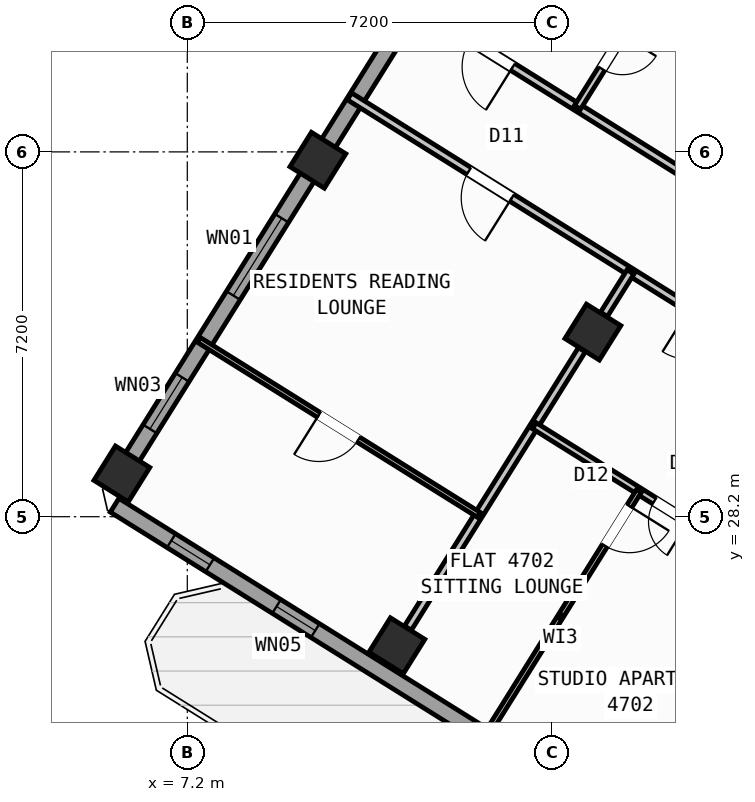
"""IFC4 building model, lengths in metres.
Left out: names, types, materials, properties, quantities, classifications, styles, units other than length and angle.
Written with IfcOpenShell. Run it as: python <this file> out.ifc"""

import sys

from ifc_helpers import new_model, si_unit, direction, frame, frame_2d, origin, origin_2d, place, context, subcontext, project, spatial, rectangle, hollow_rectangle, extrude, source, transform, mapped, element, fill, save


model = new_model("IFC4")
c1 = context("Model", 3, precision=1e-05, world=origin(), true_north=direction((0.0, 1.0)))
c2 = subcontext(c1, "Body", "Model", "MODEL_VIEW")
j1 = project(units=[si_unit("LENGTHUNIT", "METRE"), si_unit("PLANEANGLEUNIT", "RADIAN")], contexts=[c1])
p1 = place(None, origin())
s1 = spatial("IfcSite", under=j1, at=p1, CompositionType="ELEMENT")
p2 = place(p1, origin())
s2 = spatial("IfcBuilding", under=s1, at=p2, CompositionType="ELEMENT")
p3 = place(p2, frame((0.0, 0.0, 187.8)))
s3 = spatial("IfcBuildingStorey", under=s2, at=p3, CompositionType="ELEMENT", Elevation=187.8)
m1 = source(origin(), c2, "Body", "SweptSolid", [
    extrude(hollow_rectangle(XDim=0.8, YDim=0.8, WallThickness=0.032, at=origin_2d()), origin(), (0.0, 0.0, 1.0), 3.6),
])
for number, where, z_axis, x_axis in (
    (1, (15.205, 31.844, 0.0), (0.0, 0.0, 1.0), (-0.848, 0.53, 0.0)),
    (2, (11.336, 25.653, 0.0), (0.0, 0.0, 1.0), (-0.848, 0.53, 0.0)),
    (3, (9.777, 35.235, 0.0), (0.0, 0.0, 1.0), (-0.848, 0.53, 0.0)),
    (4, (5.909, 29.044, 0.0), (0.0, 0.0, 1.0), (-0.848, 0.53, 0.0)),
):
    element("IfcColumn", number, at=place(p3, frame(where, z_axis=z_axis, x_axis=x_axis)), inside=s3, PredefinedType="COLUMN", context=c2, shape_type="MappedRepresentation", body=[
        mapped(m1, transform((0.0, 0.0, 0.0), scale=1.0)),
    ])
p4 = place(p3, frame((31.76, 12.183, 0.0), z_axis=(0.0, 0.0, 1.0), x_axis=(-0.848047074256, 0.529920899612, 0.0)))
e5 = element("IfcWall", 5, at=p4, inside=s3, PredefinedType="STANDARD", context=c2, shape_type="SweptSolid", body=[
    extrude(rectangle(XDim=30.652, YDim=0.32, at=frame_2d((15.326, 0.0))), origin(), (0.0, 0.0, 1.0), 3.35),
])
p5 = place(p4, frame((15.166, 0.0, 0.0)))
e6 = element("IfcOpeningElement", 6, at=p5, cuts=e5, PredefinedType="OPENING", context=c2, shape_type="SweptSolid", body=[
    extrude(rectangle(XDim=1.2, YDim=2.15, at=frame_2d((0.6, 1.075))), frame((0.0, 0.17, 0.0), z_axis=(0.0, -1.0, 0.0), x_axis=(1.0, 0.0, 0.0)), (0.0, 0.0, 1.0), 0.34),
])
p6 = place(p4, frame((2.015, 0.0, 0.8)))
e7 = element("IfcOpeningElement", 7, at=p6, cuts=e5, PredefinedType="OPENING", context=c2, shape_type="SweptSolid", body=[
    extrude(rectangle(XDim=2.1, YDim=1.55, at=frame_2d((1.05, 0.775))), frame((0.0, 0.17, 0.0), z_axis=(0.0, -1.0, 0.0), x_axis=(1.0, 0.0, 0.0)), (0.0, 0.0, 1.0), 0.34),
])
p7 = place(p4, frame((7.244, 0.0, 0.8)))
e8 = element("IfcOpeningElement", 8, at=p7, cuts=e5, PredefinedType="OPENING", context=c2, shape_type="SweptSolid", body=[
    extrude(rectangle(XDim=2.1, YDim=1.55, at=frame_2d((1.05, 0.775))), frame((0.0, 0.17, 0.0), z_axis=(0.0, -1.0, 0.0), x_axis=(1.0, 0.0, 0.0)), (0.0, 0.0, 1.0), 0.34),
])
p8 = place(p4, frame((12.623, 0.0, 1.0)))
e9 = element("IfcOpeningElement", 9, at=p8, cuts=e5, PredefinedType="OPENING", context=c2, shape_type="SweptSolid", body=[
    extrude(rectangle(XDim=0.9, YDim=1.25, at=frame_2d((0.45, 0.625))), frame((0.0, 0.17, 0.0), z_axis=(0.0, -1.0, 0.0), x_axis=(1.0, 0.0, 0.0)), (0.0, 0.0, 1.0), 0.34),
])
p9 = place(p4, frame((19.565, 0.0, 0.95)))
e10 = element("IfcOpeningElement", 10, at=p9, cuts=e5, PredefinedType="OPENING", context=c2, shape_type="SweptSolid", body=[
    extrude(rectangle(XDim=1.2, YDim=1.4, at=frame_2d((0.6, 0.7))), frame((0.0, 0.17, 0.0), z_axis=(0.0, -1.0, 0.0), x_axis=(1.0, 0.0, 0.0)), (0.0, 0.0, 1.0), 0.34),
])
p10 = place(p4, frame((25.983, 0.0, 1.0)))
e11 = element("IfcOpeningElement", 11, at=p10, cuts=e5, PredefinedType="OPENING", context=c2, shape_type="SweptSolid", body=[
    extrude(rectangle(XDim=0.9, YDim=1.25, at=frame_2d((0.45, 0.625))), frame((0.0, 0.17, 0.0), z_axis=(0.0, -1.0, 0.0), x_axis=(1.0, 0.0, 0.0)), (0.0, 0.0, 1.0), 0.34),
])
p11 = place(p4, frame((28.433, 0.0, 1.0)))
e12 = element("IfcOpeningElement", 12, at=p11, cuts=e5, PredefinedType="OPENING", context=c2, shape_type="SweptSolid", body=[
    extrude(rectangle(XDim=0.9, YDim=1.25, at=frame_2d((0.45, 0.625))), frame((0.0, 0.17, 0.0), z_axis=(0.0, -1.0, 0.0), x_axis=(1.0, 0.0, 0.0)), (0.0, 0.0, 1.0), 0.34),
])
p12 = place(p3, frame((5.7, 28.71, 0.0), z_axis=(0.0, 0.0, 1.0), x_axis=(0.529923711467, 0.8480453172, 0.0)))
e13 = element("IfcWall", 13, at=p12, inside=s3, PredefinedType="STANDARD", context=c2, shape_type="SweptSolid", body=[
    extrude(rectangle(XDim=21.587, YDim=0.32, at=frame_2d((10.794, 0.0))), origin(), (0.0, 0.0, 1.0), 2.825),
])
p13 = place(p12, frame((1.44, 0.0, 0.95)))
e14 = element("IfcOpeningElement", 14, at=p13, cuts=e13, PredefinedType="OPENING", context=c2, shape_type="SweptSolid", body=[
    extrude(rectangle(XDim=1.2, YDim=1.4, at=frame_2d((0.6, 0.7))), frame((0.0, 0.17, 0.0), z_axis=(0.0, -1.0, 0.0), x_axis=(1.0, 0.0, 0.0)), (0.0, 0.0, 1.0), 0.34),
])
p14 = place(p12, frame((4.545, 0.0, 0.85)))
e15 = element("IfcOpeningElement", 15, at=p14, cuts=e13, PredefinedType="OPENING", context=c2, shape_type="SweptSolid", body=[
    extrude(rectangle(XDim=1.8, YDim=1.5, at=frame_2d((0.9, 0.75))), frame((0.0, 0.17, 0.0), z_axis=(0.0, -1.0, 0.0), x_axis=(1.0, 0.0, 0.0)), (0.0, 0.0, 1.0), 0.34),
])
p15 = place(p12, frame((12.139, 0.0, 1.0)))
e16 = element("IfcOpeningElement", 16, at=p15, cuts=e13, PredefinedType="OPENING", context=c2, shape_type="SweptSolid", body=[
    extrude(rectangle(XDim=0.9, YDim=1.25, at=frame_2d((0.45, 0.625))), frame((0.0, 0.17, 0.0), z_axis=(0.0, -1.0, 0.0), x_axis=(1.0, 0.0, 0.0)), (0.0, 0.0, 1.0), 0.34),
])
p16 = place(p12, frame((16.35, 0.0, 0.95)))
e17 = element("IfcOpeningElement", 17, at=p16, cuts=e13, PredefinedType="OPENING", context=c2, shape_type="SweptSolid", body=[
    extrude(rectangle(XDim=1.2, YDim=1.4, at=frame_2d((0.6, 0.7))), frame((0.0, 0.17, 0.0), z_axis=(0.0, -1.0, 0.0), x_axis=(1.0, 0.0, 0.0)), (0.0, 0.0, 1.0), 0.34),
])
p17 = place(p12, frame((18.762, 0.0, 0.95)))
e18 = element("IfcOpeningElement", 18, at=p17, cuts=e13, PredefinedType="OPENING", context=c2, shape_type="SweptSolid", body=[
    extrude(rectangle(XDim=1.2, YDim=1.4, at=frame_2d((0.6, 0.7))), frame((0.0, 0.17, 0.0), z_axis=(0.0, -1.0, 0.0), x_axis=(1.0, 0.0, 0.0)), (0.0, 0.0, 1.0), 0.34),
])
p18 = place(p3, frame((25.754, 29.497, 0.0), z_axis=(0.0, 0.0, 1.0), x_axis=(-0.848045850158, 0.529922858565, 0.0)))
e19 = element("IfcWall", 19, at=p18, inside=s3, PredefinedType="PARTITIONING", context=c2, shape_type="SweptSolid", body=[
    extrude(rectangle(XDim=16.73, YDim=0.16, at=frame_2d((8.365, 0.0))), origin(), (0.0, 0.0, 1.0), 3.34),
])
p19 = place(p18, frame((2.22, 0.0, 0.0)))
e20 = element("IfcOpeningElement", 20, at=p19, cuts=e19, PredefinedType="OPENING", context=c2, shape_type="SweptSolid", body=[
    extrude(rectangle(XDim=0.86, YDim=2.05, at=frame_2d((0.43, 1.025))), frame((0.0, 0.09, 0.0), z_axis=(0.0, -1.0, 0.0), x_axis=(1.0, 0.0, 0.0)), (0.0, 0.0, 1.0), 0.18),
])
p20 = place(p18, frame((6.49, 0.0, 0.0)))
e21 = element("IfcOpeningElement", 21, at=p20, cuts=e19, PredefinedType="OPENING", context=c2, shape_type="SweptSolid", body=[
    extrude(rectangle(XDim=1.0, YDim=2.1, at=frame_2d((0.5, 1.05))), frame((0.0, 0.09, 0.0), z_axis=(0.0, -1.0, 0.0), x_axis=(1.0, 0.0, 0.0)), (0.0, 0.0, 1.0), 0.18),
])
p21 = place(p18, frame((14.304, 0.0, 0.0)))
e22 = element("IfcOpeningElement", 22, at=p21, cuts=e19, PredefinedType="OPENING", context=c2, shape_type="SweptSolid", body=[
    extrude(rectangle(XDim=1.0, YDim=2.1, at=frame_2d((0.5, 1.05))), frame((0.0, 0.09, 0.0), z_axis=(0.0, -1.0, 0.0), x_axis=(1.0, 0.0, 0.0)), (0.0, 0.0, 1.0), 0.18),
])
p22 = place(p3, frame((24.588, 27.631, 0.0), z_axis=(0.0, 0.0, 1.0), x_axis=(-0.848041752158, 0.529929416617, 0.0)))
e23 = element("IfcWall", 23, at=p22, inside=s3, PredefinedType="PARTITIONING", context=c2, shape_type="SweptSolid", body=[
    extrude(rectangle(XDim=16.73, YDim=0.16, at=frame_2d((8.365, 0.0))), origin(), (0.0, 0.0, 1.0), 3.34),
])
p23 = place(p22, frame((2.22, 0.0, 0.0)))
e24 = element("IfcOpeningElement", 24, at=p23, cuts=e23, PredefinedType="OPENING", context=c2, shape_type="SweptSolid", body=[
    extrude(rectangle(XDim=0.86, YDim=2.05, at=frame_2d((0.43, 1.025))), frame((0.0, 0.09, 0.0), z_axis=(0.0, -1.0, 0.0), x_axis=(1.0, 0.0, 0.0)), (0.0, 0.0, 1.0), 0.18),
])
p24 = place(p22, frame((7.82, 0.0, 0.0)))
e25 = element("IfcOpeningElement", 25, at=p24, cuts=e23, PredefinedType="OPENING", context=c2, shape_type="SweptSolid", body=[
    extrude(rectangle(XDim=1.0, YDim=2.1, at=frame_2d((0.5, 1.05))), frame((0.0, 0.09, 0.0), z_axis=(0.0, -1.0, 0.0), x_axis=(1.0, 0.0, 0.0)), (0.0, 0.0, 1.0), 0.18),
])
p25 = place(p22, frame((12.95, 0.0, 0.0)))
e26 = element("IfcOpeningElement", 26, at=p25, cuts=e23, PredefinedType="OPENING", context=c2, shape_type="SweptSolid", body=[
    extrude(rectangle(XDim=1.0, YDim=2.1, at=frame_2d((0.5, 1.05))), frame((0.0, 0.09, 0.0), z_axis=(0.0, -1.0, 0.0), x_axis=(1.0, 0.0, 0.0)), (0.0, 0.0, 1.0), 0.18),
])
p26 = place(p3, frame((15.946, 33.031, 0.0), z_axis=(0.0, 0.0, 1.0), x_axis=(-0.529821225456, -0.848109349704, 0.0)))
e27 = element("IfcWall", 27, at=p26, inside=s3, PredefinedType="PARTITIONING", context=c2, shape_type="SweptSolid", body=[
    extrude(rectangle(XDim=0.988, YDim=0.16, at=frame_2d((0.494, 0.0))), origin(), (0.0, 0.0, 1.0), 2.825),
])
p27 = place(p3, frame((14.986, 31.494, 0.0), z_axis=(0.0, 0.0, 1.0), x_axis=(-0.529907440938, -0.848055484057, 0.0)))
e28 = element("IfcWall", 28, at=p27, inside=s3, PredefinedType="PARTITIONING", context=c2, shape_type="SweptSolid", body=[
    extrude(rectangle(XDim=6.476, YDim=0.16, at=frame_2d((3.238, 0.0))), origin(), (0.0, 0.0, 1.0), 2.825),
])
p28 = place(p3, frame((19.477, 26.603, 0.0), z_axis=(0.0, 0.0, 1.0), x_axis=(-0.848039019877, 0.529933789039, 0.0)))
e29 = element("IfcWall", 29, at=p28, inside=s3, PredefinedType="PLUMBINGWALL", context=c2, shape_type="SweptSolid", body=[
    extrude(rectangle(XDim=6.4, YDim=0.14, at=frame_2d((3.2, 0.0))), origin(), (0.0, 0.0, 1.0), 3.34),
])
p29 = place(p28, frame((2.824, 0.0, 0.0)))
e30 = element("IfcOpeningElement", 30, at=p29, cuts=e29, PredefinedType="OPENING", context=c2, shape_type="SweptSolid", body=[
    extrude(rectangle(XDim=0.78, YDim=2.05, at=frame_2d((0.39, 1.025))), frame((0.0, 0.08, 0.0), z_axis=(0.0, -1.0, 0.0), x_axis=(1.0, 0.0, 0.0)), (0.0, 0.0, 1.0), 0.16),
])
p30 = place(p3, frame((16.112, 28.706, 0.0), z_axis=(0.0, 0.0, 1.0), x_axis=(-0.529916267533, -0.848049968695, 0.0)))
e31 = element("IfcWall", 31, at=p30, inside=s3, PredefinedType="PARTITIONING", context=c2, shape_type="SweptSolid", body=[
    extrude(rectangle(XDim=5.84, YDim=0.11, at=frame_2d((2.92, 0.0))), origin(), (0.0, 0.0, 1.0), 3.34),
])
p31 = place(p30, frame((0.35, 0.0, 0.0)))
e32 = element("IfcOpeningElement", 32, at=p31, cuts=e31, PredefinedType="OPENING", context=c2, shape_type="SweptSolid", body=[
    extrude(rectangle(XDim=0.92, YDim=2.08, at=frame_2d((0.46, 1.04))), frame((0.0, 0.065, 0.0), z_axis=(0.0, -1.0, 0.0), x_axis=(1.0, 0.0, 0.0)), (0.0, 0.0, 1.0), 0.13),
])
p32 = place(p3, frame((12.951, 28.238, 0.0), z_axis=(0.0, 0.0, 1.0), x_axis=(-0.848031959833, 0.529945086874, 0.0)))
e33 = element("IfcWall", 33, at=p32, inside=s3, PredefinedType="PARTITIONING", context=c2, shape_type="SweptSolid", body=[
    extrude(rectangle(XDim=6.52, YDim=0.11, at=frame_2d((3.26, 0.0))), origin(), (0.0, 0.0, 1.0), 3.34),
])
p33 = place(p32, frame((2.8, 0.0, 0.0)))
e34 = element("IfcOpeningElement", 34, at=p33, cuts=e33, PredefinedType="OPENING", context=c2, shape_type="SweptSolid", body=[
    extrude(rectangle(XDim=0.92, YDim=2.08, at=frame_2d((0.46, 1.04))), frame((0.0, 0.065, 0.0), z_axis=(0.0, -1.0, 0.0), x_axis=(1.0, 0.0, 0.0)), (0.0, 0.0, 1.0), 0.13),
])
p34 = place(p3, frame((18.479, 37.084, 0.0), z_axis=(0.0, 0.0, 1.0), x_axis=(-0.848048787466, 0.529918157905, 0.0)))
e35 = element("IfcWall", 35, at=p34, inside=s3, PredefinedType="PLUMBINGWALL", context=c2, shape_type="SweptSolid", body=[
    extrude(rectangle(XDim=6.52, YDim=0.14, at=frame_2d((3.26, 0.0))), origin(), (0.0, 0.0, 1.0), 3.34),
])
p35 = place(p34, frame((2.885, 0.0, 0.0)))
e36 = element("IfcOpeningElement", 36, at=p35, cuts=e35, PredefinedType="OPENING", context=c2, shape_type="SweptSolid", body=[
    extrude(rectangle(XDim=0.78, YDim=2.05, at=frame_2d((0.39, 1.025))), frame((0.0, 0.08, 0.0), z_axis=(0.0, -1.0, 0.0), x_axis=(1.0, 0.0, 0.0)), (0.0, 0.0, 1.0), 0.16),
])
p36 = place(p3, frame((16.268, 38.467, 0.0), z_axis=(0.0, 0.0, 1.0), x_axis=(-0.529913878929, -0.848051461244, 0.0)))
e37 = element("IfcWall", 37, at=p36, inside=s3, PredefinedType="PLUMBINGWALL", context=c2, shape_type="SweptSolid", body=[
    extrude(rectangle(XDim=2.58, YDim=0.14, at=frame_2d((1.29, 0.0))), origin(), (0.0, 0.0, 1.0), 3.34),
])
p37 = place(p36, frame((0.9, 0.0, 0.0)))
e38 = element("IfcOpeningElement", 38, at=p37, cuts=e37, PredefinedType="OPENING", context=c2, shape_type="SweptSolid", body=[
    extrude(rectangle(XDim=0.78, YDim=2.05, at=frame_2d((0.39, 1.025))), frame((0.0, 0.08, 0.0), z_axis=(0.0, -1.0, 0.0), x_axis=(1.0, 0.0, 0.0)), (0.0, 0.0, 1.0), 0.16),
])
m2 = source(origin(), c2, "Body", "SweptSolid", [
    extrude(rectangle(XDim=0.9, YDim=1.25, at=frame_2d((0.45, 0.625))), frame((0.0, 0.03, 0.0), z_axis=(0.0, -1.0, 0.0), x_axis=(1.0, 0.0, 0.0)), (0.0, 0.0, 1.0), 0.06),
])
p38 = place(p10, origin())
e39 = element("IfcWindow", 39, at=p38, inside=s3, PartitioningType="SINGLE_PANEL", PredefinedType="WINDOW", context=c2, shape_type="MappedRepresentation", body=[
    mapped(m2, transform((0.0, 0.0, 0.0), scale=1.0)),
])
fill(e11, e39)
p39 = place(p11, origin())
e40 = element("IfcWindow", 40, at=p39, inside=s3, PartitioningType="SINGLE_PANEL", PredefinedType="WINDOW", context=c2, shape_type="MappedRepresentation", body=[
    mapped(m2, transform((0.0, 0.0, 0.0), scale=1.0)),
])
fill(e12, e40)
m3 = source(origin(), c2, "Body", "SweptSolid", [
    extrude(rectangle(XDim=1.2, YDim=1.4, at=frame_2d((0.6, 0.7))), frame((0.0, 0.03, 0.0), z_axis=(0.0, -1.0, 0.0), x_axis=(1.0, 0.0, 0.0)), (0.0, 0.0, 1.0), 0.06),
])
p40 = place(p13, origin())
e41 = element("IfcWindow", 41, at=p40, inside=s3, PartitioningType="SINGLE_PANEL", PredefinedType="WINDOW", context=c2, shape_type="MappedRepresentation", body=[
    mapped(m3, transform((0.0, 0.0, 0.0), scale=1.0)),
])
fill(e14, e41)
m4 = source(origin(), c2, "Body", "SweptSolid", [
    extrude(rectangle(XDim=1.8, YDim=1.5, at=frame_2d((0.9, 0.75))), frame((0.0, 0.03, 0.0), z_axis=(0.0, -1.0, 0.0), x_axis=(1.0, 0.0, 0.0)), (0.0, 0.0, 1.0), 0.06),
])
p41 = place(p14, origin())
e42 = element("IfcWindow", 42, at=p41, inside=s3, PartitioningType="SINGLE_PANEL", PredefinedType="WINDOW", context=c2, shape_type="MappedRepresentation", body=[
    mapped(m4, transform((0.0, 0.0, 0.0), scale=1.0)),
])
fill(e15, e42)
m5 = source(origin(), c2, "Body", "SweptSolid", [
    extrude(rectangle(XDim=0.92, YDim=2.08, at=frame_2d((0.46, 1.04))), frame((0.0, 0.025, 0.0), z_axis=(0.0, -1.0, 0.0), x_axis=(1.0, 0.0, 0.0)), (0.0, 0.0, 1.0), 0.05),
])
p42 = place(p31, origin())
e43 = element("IfcDoor", 43, at=p42, inside=s3, OperationType="SINGLE_SWING_LEFT", PredefinedType="DOOR", context=c2, shape_type="MappedRepresentation", body=[
    mapped(m5, transform((0.0, 0.0, 0.0), scale=1.0)),
])
fill(e32, e43)
m6 = source(origin(), c2, "Body", "SweptSolid", [
    extrude(rectangle(XDim=0.78, YDim=2.05, at=frame_2d((0.39, 1.025))), frame((0.0, 0.025, 0.0), z_axis=(0.0, -1.0, 0.0), x_axis=(1.0, 0.0, 0.0)), (0.0, 0.0, 1.0), 0.05),
])
p43 = place(p29, origin())
e44 = element("IfcDoor", 44, at=p43, inside=s3, OperationType="SINGLE_SWING_LEFT", PredefinedType="DOOR", context=c2, shape_type="MappedRepresentation", body=[
    mapped(m6, transform((0.0, 0.0, 0.0), scale=1.0)),
])
fill(e30, e44)
m7 = source(origin(), c2, "Body", "SweptSolid", [
    extrude(rectangle(XDim=1.0, YDim=2.1, at=frame_2d((0.5, 1.05))), frame((0.0, 0.025, 0.0), z_axis=(0.0, -1.0, 0.0), x_axis=(1.0, 0.0, 0.0)), (0.0, 0.0, 1.0), 0.05),
])
p44 = place(p25, origin())
e45 = element("IfcDoor", 45, at=p44, inside=s3, OperationType="SINGLE_SWING_LEFT", PredefinedType="DOOR", context=c2, shape_type="MappedRepresentation", body=[
    mapped(m7, transform((0.0, 0.0, 0.0), scale=1.0)),
])
fill(e26, e45)
p45 = place(p33, origin())
e46 = element("IfcDoor", 46, at=p45, inside=s3, OperationType="SINGLE_SWING_RIGHT", PredefinedType="DOOR", context=c2, shape_type="MappedRepresentation", body=[
    mapped(m5, transform((0.0, 0.0, 0.0), scale=1.0)),
])
fill(e34, e46)
p46 = place(p21, origin())
e47 = element("IfcDoor", 47, at=p46, inside=s3, OperationType="SINGLE_SWING_LEFT", PredefinedType="DOOR", context=c2, shape_type="MappedRepresentation", body=[
    mapped(m7, transform((0.0, 0.0, 0.0), scale=1.0)),
])
fill(e22, e47)
p47 = place(p37, origin())
e48 = element("IfcDoor", 48, at=p47, inside=s3, OperationType="SINGLE_SWING_LEFT", PredefinedType="DOOR", context=c2, shape_type="MappedRepresentation", body=[
    mapped(m6, transform((0.0, 0.0, 0.0), scale=1.0)),
])
fill(e38, e48)
save(model, sys.argv[1])
